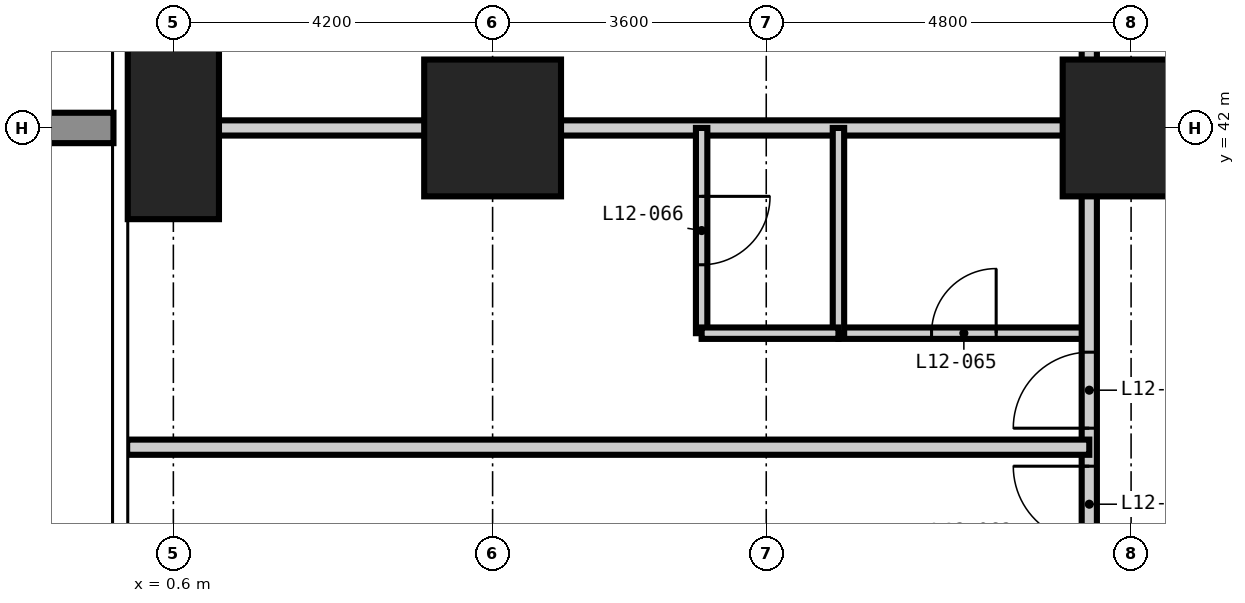
"""IFC4 building model, lengths in metres.
Left out: names, types, materials, properties, quantities, classifications, styles, units other than length and angle.
Written with IfcOpenShell. Run it as: python <this file> out.ifc"""

import sys

from ifc_helpers import new_model, si_unit, direction, frame, frame_2d, origin, origin_2d, place, context, subcontext, project, spatial, rectangle, extrude, element, fill, save


model = new_model("IFC4")
c1 = context("Model", 3, precision=1e-05, world=origin(), true_north=direction((0.0, 1.0)))
c2 = subcontext(c1, "Body", "Model", "MODEL_VIEW")
j1 = project(units=[si_unit("LENGTHUNIT", "METRE"), si_unit("PLANEANGLEUNIT", "RADIAN")], contexts=[c1])
p1 = place(None, origin())
s1 = spatial("IfcSite", under=j1, at=p1, CompositionType="ELEMENT")
p2 = place(p1, origin())
s2 = spatial("IfcBuilding", under=s1, at=p2, CompositionType="ELEMENT")
p3 = place(p2, frame((0.0, 0.0, 52.2)))
s3 = spatial("IfcBuildingStorey", under=s2, at=p3, CompositionType="ELEMENT", Elevation=52.2)
p4 = place(p3, frame((0.6, 42.0, -0.35), z_axis=(0.0, 0.0, 1.0), x_axis=(1.0, 0.0, 0.0)))
e1 = element("IfcColumn", 1, at=p4, inside=s3, PredefinedType="COLUMN", context=c2, shape_type="SweptSolid", body=[
    extrude(rectangle(XDim=1.2, YDim=2.4, at=origin_2d()), origin(), (0.0, 0.0, 1.0), 3.6),
])
for number, where, z_axis, x_axis in (
    (2, (4.8, 42.0, -0.35), (0.0, 0.0, 1.0), (1.0, 0.0, 0.0)),
    (3, (13.2, 42.0, -0.35), (0.0, 0.0, 1.0), (1.0, 0.0, 0.0)),
):
    element("IfcColumn", number, at=place(p3, frame(where, z_axis=z_axis, x_axis=x_axis)), inside=s3, PredefinedType="COLUMN", context=c2, shape_type="SweptSolid", body=[
        extrude(rectangle(XDim=1.8, YDim=1.8, at=origin_2d()), origin(), (0.0, 0.0, 1.0), 3.6),
    ])
p5 = place(p3, frame((9.35, 39.3, 0.0), z_axis=(0.0, 0.0, 1.0), x_axis=(1.0, 0.0, 0.0)))
e4 = element("IfcWall", 4, at=p5, inside=s3, PredefinedType="PARTITIONING", context=c2, shape_type="SweptSolid", body=[
    extrude(rectangle(XDim=3.3, YDim=0.15, at=frame_2d((1.65, 0.0))), origin(), (0.0, 0.0, 1.0), 3.25),
])
p6 = place(p5, frame((1.225, 0.0, 0.0)))
e5 = element("IfcOpeningElement", 5, at=p6, cuts=e4, PredefinedType="OPENING", context=c2, shape_type="SweptSolid", body=[
    extrude(rectangle(XDim=0.85, YDim=2.1, at=frame_2d((0.425, 1.05))), frame((0.0, 0.085, 0.0), z_axis=(0.0, -1.0, 0.0), x_axis=(1.0, 0.0, 0.0)), (0.0, 0.0, 1.0), 0.17),
])
p7 = place(p3, frame((12.65, 12.65, 0.0), z_axis=(0.0, 0.0, 1.0), x_axis=(0.0, 1.0, 0.0)))
e6 = element("IfcWall", 6, at=p7, inside=s3, PredefinedType="PARTITIONING", context=c2, shape_type="SweptSolid", body=[
    extrude(rectangle(XDim=32.9, YDim=0.2, at=frame_2d((16.45, 0.0))), origin(), (0.0, 0.0, 1.0), 3.25),
])
p8 = place(p7, frame((8.75, 0.0, 0.0)))
e7 = element("IfcOpeningElement", 7, at=p8, cuts=e6, PredefinedType="OPENING", context=c2, shape_type="SweptSolid", body=[
    extrude(rectangle(XDim=1.0, YDim=2.2, at=frame_2d((0.5, 1.1))), frame((0.0, 0.11, 0.0), z_axis=(0.0, -1.0, 0.0), x_axis=(1.0, 0.0, 0.0)), (0.0, 0.0, 1.0), 0.22),
])
p9 = place(p7, frame((17.0, 0.0, 0.0)))
e8 = element("IfcOpeningElement", 8, at=p9, cuts=e6, PredefinedType="OPENING", context=c2, shape_type="SweptSolid", body=[
    extrude(rectangle(XDim=1.0, YDim=2.2, at=frame_2d((0.5, 1.1))), frame((0.0, 0.11, 0.0), z_axis=(0.0, -1.0, 0.0), x_axis=(1.0, 0.0, 0.0)), (0.0, 0.0, 1.0), 0.22),
])
p10 = place(p7, frame((23.9, 0.0, 0.0)))
e9 = element("IfcOpeningElement", 9, at=p10, cuts=e6, PredefinedType="OPENING", context=c2, shape_type="SweptSolid", body=[
    extrude(rectangle(XDim=1.0, YDim=2.2, at=frame_2d((0.5, 1.1))), frame((0.0, 0.11, 0.0), z_axis=(0.0, -1.0, 0.0), x_axis=(1.0, 0.0, 0.0)), (0.0, 0.0, 1.0), 0.22),
])
p11 = place(p7, frame((25.4, 0.0, 0.0)))
e10 = element("IfcOpeningElement", 10, at=p11, cuts=e6, PredefinedType="OPENING", context=c2, shape_type="SweptSolid", body=[
    extrude(rectangle(XDim=1.0, YDim=2.2, at=frame_2d((0.5, 1.1))), frame((0.0, 0.11, 0.0), z_axis=(0.0, -1.0, 0.0), x_axis=(1.0, 0.0, 0.0)), (0.0, 0.0, 1.0), 0.22),
])
p12 = place(p7, frame((1.575, 0.0, 0.0)))
e11 = element("IfcOpeningElement", 11, at=p12, cuts=e6, PredefinedType="OPENING", context=c2, shape_type="SweptSolid", body=[
    extrude(rectangle(XDim=1.0, YDim=2.2, at=frame_2d((0.5, 1.1))), frame((0.0, 0.11, 0.0), z_axis=(0.0, -1.0, 0.0), x_axis=(1.0, 0.0, 0.0)), (0.0, 0.0, 1.0), 0.22),
])
p13 = place(p7, frame((30.625, 0.0, 0.0)))
e12 = element("IfcOpeningElement", 12, at=p13, cuts=e6, PredefinedType="OPENING", context=c2, shape_type="SweptSolid", body=[
    extrude(rectangle(XDim=1.0, YDim=2.2, at=frame_2d((0.5, 1.1))), frame((0.0, 0.11, 0.0), z_axis=(0.0, -1.0, 0.0), x_axis=(1.0, 0.0, 0.0)), (0.0, 0.0, 1.0), 0.22),
])
for number, where, z_axis, x_axis in (
    (13, (-0.008, 37.8, 0.0), (0.0, 0.0, 1.0), (1.0, 0.0, 0.0)),
    (14, (-0.008, 42.0, 0.0), (0.0, 0.0, 1.0), (1.0, 0.0, 0.0)),
):
    element("IfcWall", number, at=place(p3, frame(where, z_axis=z_axis, x_axis=x_axis)), inside=s3, PredefinedType="PARTITIONING", context=c2, shape_type="SweptSolid", body=[
        extrude(rectangle(XDim=12.658, YDim=0.2, at=frame_2d((6.329, 0.0))), origin(), (0.0, 0.0, 1.0), 3.25),
    ])
p14 = place(p3, frame((7.55, 39.3, 0.0), z_axis=(0.0, 0.0, 1.0), x_axis=(0.0, 1.0, 0.0)))
e15 = element("IfcWall", 15, at=p14, inside=s3, PredefinedType="PARTITIONING", context=c2, shape_type="SweptSolid", body=[
    extrude(rectangle(XDim=2.7, YDim=0.15, at=frame_2d((1.35, 0.0))), origin(), (0.0, 0.0, 1.0), 3.25),
])
p15 = place(p14, frame((0.9, 0.0, 0.0)))
e16 = element("IfcOpeningElement", 16, at=p15, cuts=e15, PredefinedType="OPENING", context=c2, shape_type="SweptSolid", body=[
    extrude(rectangle(XDim=0.9, YDim=2.1, at=frame_2d((0.45, 1.05))), frame((0.0, 0.085, 0.0), z_axis=(0.0, -1.0, 0.0), x_axis=(1.0, 0.0, 0.0)), (0.0, 0.0, 1.0), 0.17),
])
p16 = place(p3, frame((9.35, 39.3, 0.0), z_axis=(0.0, 0.0, 1.0), x_axis=(0.0, 1.0, 0.0)))
e17 = element("IfcWall", 17, at=p16, inside=s3, PredefinedType="PARTITIONING", context=c2, shape_type="SweptSolid", body=[
    extrude(rectangle(XDim=2.7, YDim=0.15, at=frame_2d((1.35, 0.0))), origin(), (0.0, 0.0, 1.0), 3.25),
])
p17 = place(p3, frame((7.55, 39.3, 0.0), z_axis=(0.0, 0.0, 1.0), x_axis=(1.0, 0.0, 0.0)))
e18 = element("IfcWall", 18, at=p17, inside=s3, PredefinedType="PARTITIONING", context=c2, shape_type="SweptSolid", body=[
    extrude(rectangle(XDim=1.8, YDim=0.15, at=frame_2d((0.9, 0.0))), origin(), (0.0, 0.0, 1.0), 3.25),
])
p18 = place(p10, origin())
e19 = element("IfcDoor", 19, at=p18, inside=s3, OperationType="SINGLE_SWING_RIGHT", PredefinedType="DOOR", context=c2, shape_type="SweptSolid", body=[
    extrude(rectangle(XDim=1.0, YDim=2.2, at=frame_2d((0.5, 1.1))), frame((0.0, 0.025, 0.0), z_axis=(0.0, -1.0, 0.0), x_axis=(1.0, 0.0, 0.0)), (0.0, 0.0, 1.0), 0.05),
])
fill(e9, e19)
p19 = place(p11, origin())
e20 = element("IfcDoor", 20, at=p19, inside=s3, OperationType="SINGLE_SWING_LEFT", PredefinedType="DOOR", context=c2, shape_type="SweptSolid", body=[
    extrude(rectangle(XDim=1.0, YDim=2.2, at=frame_2d((0.5, 1.1))), frame((0.0, 0.025, 0.0), z_axis=(0.0, -1.0, 0.0), x_axis=(1.0, 0.0, 0.0)), (0.0, 0.0, 1.0), 0.05),
])
fill(e10, e20)
p20 = place(p6, origin())
e21 = element("IfcDoor", 21, at=p20, inside=s3, OperationType="SINGLE_SWING_RIGHT", PredefinedType="DOOR", context=c2, shape_type="SweptSolid", body=[
    extrude(rectangle(XDim=0.85, YDim=2.1, at=frame_2d((0.425, 1.05))), frame((0.0, 0.025, 0.0), z_axis=(0.0, -1.0, 0.0), x_axis=(1.0, 0.0, 0.0)), (0.0, 0.0, 1.0), 0.05),
])
fill(e5, e21)
p21 = place(p15, frame((0.9, 0.0, 0.0), z_axis=(0.0, 0.0, 1.0), x_axis=(-1.0, 0.0, 0.0)))
e22 = element("IfcDoor", 22, at=p21, inside=s3, OperationType="SINGLE_SWING_LEFT", PredefinedType="DOOR", context=c2, shape_type="SweptSolid", body=[
    extrude(rectangle(XDim=0.9, YDim=2.1, at=frame_2d((0.45, 1.05))), frame((0.0, 0.025, 0.0), z_axis=(0.0, -1.0, 0.0), x_axis=(1.0, 0.0, 0.0)), (0.0, 0.0, 1.0), 0.05),
])
fill(e16, e22)
save(model, sys.argv[1])
